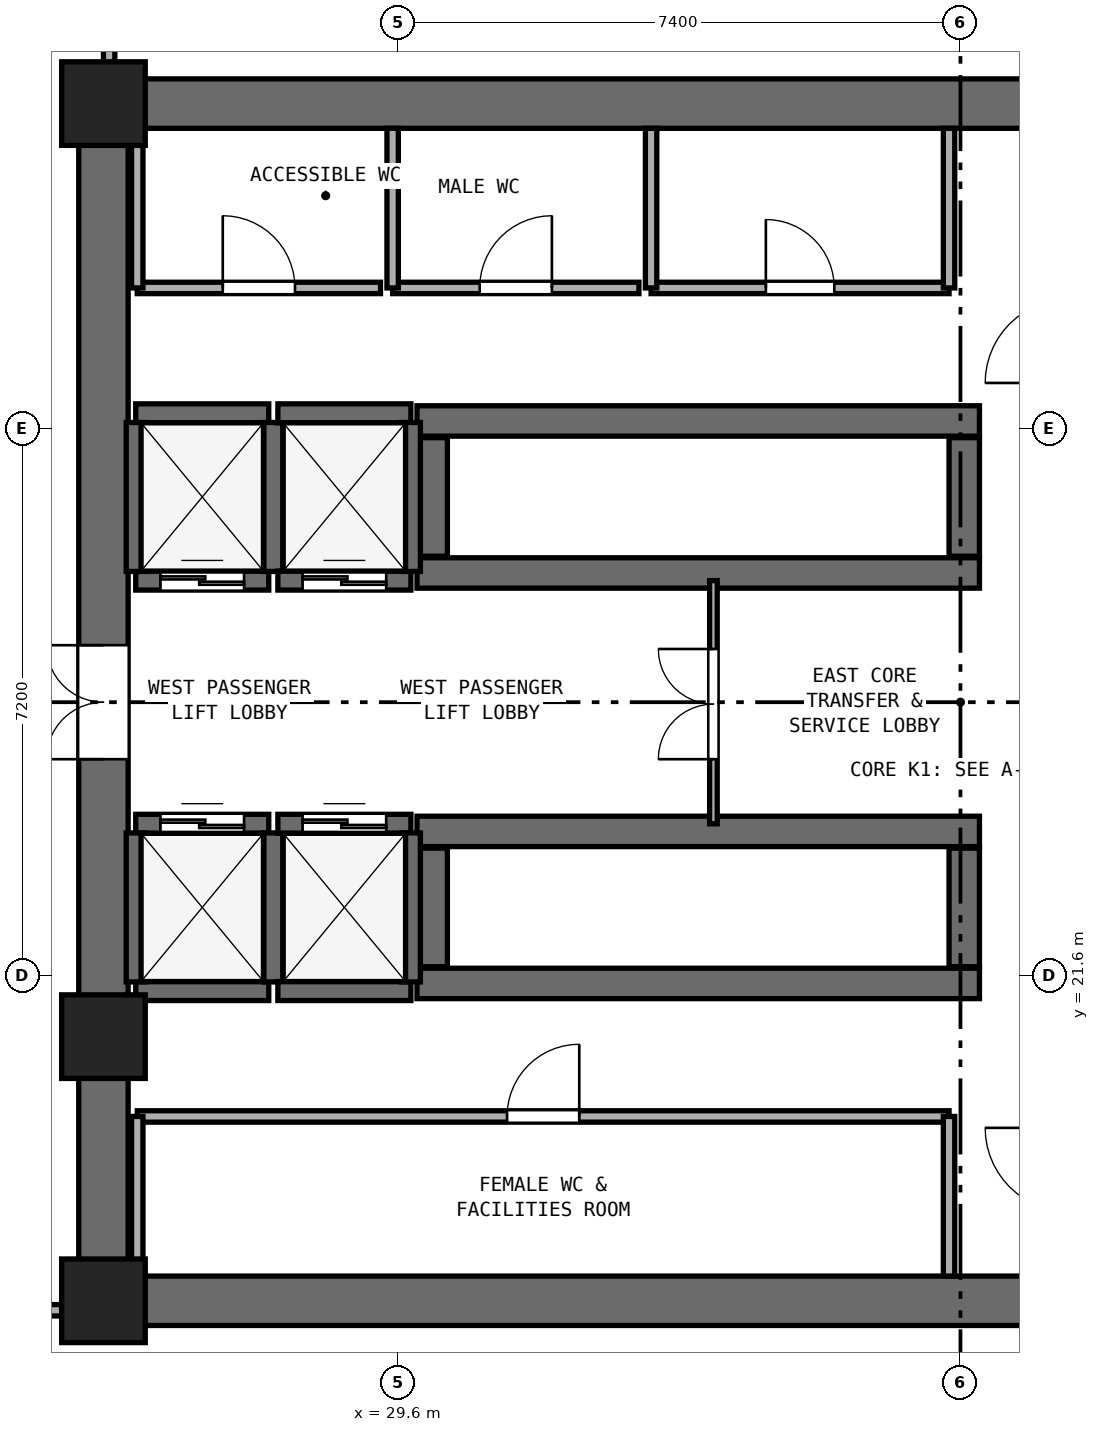
"""IFC4 building model, lengths in metres.
Left out: names, types, materials, properties, quantities, classifications, styles, units other than length and angle.
Written with IfcOpenShell. Run it as: python <this file> out.ifc"""

import sys

from ifc_helpers import new_model, si_unit, direction, frame, frame_2d, origin, origin_2d, place, context, subcontext, project, spatial, rectangle, extrude, element, fill, save


model = new_model("IFC4")
c1 = context("Model", 3, precision=1e-05, world=origin(), true_north=direction((0.0, 1.0)))
c2 = subcontext(c1, "Body", "Model", "MODEL_VIEW")
j1 = project(units=[si_unit("LENGTHUNIT", "METRE"), si_unit("PLANEANGLEUNIT", "RADIAN")], contexts=[c1])
p1 = place(None, origin())
s1 = spatial("IfcSite", under=j1, at=p1, CompositionType="ELEMENT")
p2 = place(p1, origin())
s2 = spatial("IfcBuilding", under=s1, at=p2, CompositionType="ELEMENT")
p3 = place(p2, frame((0.0, 0.0, -4.8)))
s3 = spatial("IfcBuildingStorey", under=s2, at=p3, CompositionType="ELEMENT", Elevation=-4.8)
for number, where, z_axis, x_axis in (
    (1, (25.4, 17.325, 0.0), (0.0, 0.0, 1.0), (1.0, 0.0, 0.0)),
    (2, (25.4, 33.075, 0.0), (0.0, 0.0, 1.0), (1.0, 0.0, 0.0)),
):
    element("IfcWall", number, at=place(p3, frame(where, z_axis=z_axis, x_axis=x_axis)), inside=s3, PredefinedType="SHEAR", context=c2, shape_type="SweptSolid", body=[
        extrude(rectangle(XDim=23.2, YDim=0.65, at=frame_2d((11.6, 0.0))), origin(), (0.0, 0.0, 1.0), 4.45),
    ])
p4 = place(p3, frame((25.725, 17.65, 0.0), z_axis=(0.0, 0.0, 1.0), x_axis=(0.0, 1.0, 0.0)))
e3 = element("IfcWall", 3, at=p4, inside=s3, PredefinedType="SHEAR", context=c2, shape_type="SweptSolid", body=[
    extrude(rectangle(XDim=15.1, YDim=0.65, at=frame_2d((7.55, 0.0))), origin(), (0.0, 0.0, 1.0), 4.45),
])
p5 = place(p4, frame((6.8, 0.0, 0.0)))
e4 = element("IfcOpeningElement", 4, at=p5, cuts=e3, PredefinedType="OPENING", context=c2, shape_type="SweptSolid", body=[
    extrude(rectangle(XDim=1.5, YDim=2.15, at=frame_2d((0.75, 1.075))), frame((0.0, 0.335, 0.0), z_axis=(0.0, -1.0, 0.0), x_axis=(1.0, 0.0, 0.0)), (0.0, 0.0, 1.0), 0.67),
])
for number, where, z_axis, x_axis in (
    (5, (25.725, 17.325, 0.0), (0.0, 0.0, 1.0), (1.0, 0.0, 0.0)),
    (6, (25.725, 33.075, 0.0), (0.0, 0.0, 1.0), (1.0, 0.0, 0.0)),
    (7, (25.725, 20.8, 0.0), (0.0, 0.0, 1.0), (1.0, 0.0, 0.0)),
):
    element("IfcColumn", number, at=place(p3, frame(where, z_axis=z_axis, x_axis=x_axis)), inside=s3, PredefinedType="PILASTER", context=c2, shape_type="SweptSolid", body=[
        extrude(rectangle(XDim=1.1, YDim=1.1, at=origin_2d()), origin(), (0.0, 0.0, 1.0), 4.8),
    ])
for number, where, z_axis, x_axis in (
    (8, (29.85, 21.5, 0.0), (0.0, 0.0, 1.0), (1.0, 0.0, 0.0)),
    (9, (29.85, 23.5, 0.0), (0.0, 0.0, 1.0), (1.0, 0.0, 0.0)),
):
    element("IfcWall", number, at=place(p3, frame(where, z_axis=z_axis, x_axis=x_axis)), inside=s3, PredefinedType="SOLIDWALL", context=c2, shape_type="SweptSolid", body=[
        extrude(rectangle(XDim=7.4, YDim=0.4, at=frame_2d((3.7, 0.0))), origin(), (0.0, 0.0, 1.0), 4.4),
    ])
for number, where, z_axis, x_axis in (
    (10, (30.05, 21.72, 0.0), (0.0, 0.0, 1.0), (0.0, 1.0, 0.0)),
    (11, (37.05, 21.72, 0.0), (0.0, 0.0, 1.0), (0.0, 1.0, 0.0)),
):
    element("IfcWall", number, at=place(p3, frame(where, z_axis=z_axis, x_axis=x_axis)), inside=s3, PredefinedType="SOLIDWALL", context=c2, shape_type="SweptSolid", body=[
        extrude(rectangle(XDim=1.56, YDim=0.4, at=frame_2d((0.78, 0.0))), origin(), (0.0, 0.0, 1.0), 4.4),
    ])
for number, where, z_axis, x_axis in (
    (12, (29.85, 26.9, 0.0), (0.0, 0.0, 1.0), (1.0, 0.0, 0.0)),
    (13, (29.85, 28.9, 0.0), (0.0, 0.0, 1.0), (1.0, 0.0, 0.0)),
):
    element("IfcWall", number, at=place(p3, frame(where, z_axis=z_axis, x_axis=x_axis)), inside=s3, PredefinedType="SOLIDWALL", context=c2, shape_type="SweptSolid", body=[
        extrude(rectangle(XDim=7.4, YDim=0.4, at=frame_2d((3.7, 0.0))), origin(), (0.0, 0.0, 1.0), 4.4),
    ])
for number, where, z_axis, x_axis in (
    (14, (30.05, 27.12, 0.0), (0.0, 0.0, 1.0), (0.0, 1.0, 0.0)),
    (15, (37.05, 27.12, 0.0), (0.0, 0.0, 1.0), (0.0, 1.0, 0.0)),
):
    element("IfcWall", number, at=place(p3, frame(where, z_axis=z_axis, x_axis=x_axis)), inside=s3, PredefinedType="SOLIDWALL", context=c2, shape_type="SweptSolid", body=[
        extrude(rectangle(XDim=1.56, YDim=0.4, at=frame_2d((0.78, 0.0))), origin(), (0.0, 0.0, 1.0), 4.4),
    ])
p6 = place(p3, frame((26.15, 26.8, 0.0), z_axis=(0.0, 0.0, 1.0), x_axis=(1.0, 0.0, 0.0)))
e16 = element("IfcWall", 16, at=p6, inside=s3, PredefinedType="SHEAR", context=c2, shape_type="SweptSolid", body=[
    extrude(rectangle(XDim=1.75, YDim=0.25, at=frame_2d((0.875, 0.0))), origin(), (0.0, 0.0, 1.0), 4.45),
])
p7 = place(p6, frame((0.325, 0.0, 0.0)))
e17 = element("IfcOpeningElement", 17, at=p7, cuts=e16, PredefinedType="OPENING", context=c2, shape_type="SweptSolid", body=[
    extrude(rectangle(XDim=1.1, YDim=2.15, at=frame_2d((0.55, 1.075))), frame((0.0, 0.135, 0.0), z_axis=(0.0, -1.0, 0.0), x_axis=(1.0, 0.0, 0.0)), (0.0, 0.0, 1.0), 0.27),
])
p8 = place(p3, frame((26.15, 29.0, 0.0), z_axis=(0.0, 0.0, 1.0), x_axis=(1.0, 0.0, 0.0)))
e18 = element("IfcWall", 18, at=p8, inside=s3, PredefinedType="SHEAR", context=c2, shape_type="SweptSolid", body=[
    extrude(rectangle(XDim=1.75, YDim=0.25, at=frame_2d((0.875, 0.0))), origin(), (0.0, 0.0, 1.0), 4.45),
])
for number, where, z_axis, x_axis in (
    (19, (26.15, 26.92, 0.0), (0.0, 0.0, 1.0), (0.0, 1.0, 0.0)),
    (20, (27.96, 26.92, 0.0), (0.0, 0.0, 1.0), (0.0, 1.0, 0.0)),
):
    element("IfcWall", number, at=place(p3, frame(where, z_axis=z_axis, x_axis=x_axis)), inside=s3, PredefinedType="SHEAR", context=c2, shape_type="SweptSolid", body=[
        extrude(rectangle(XDim=1.96, YDim=0.25, at=frame_2d((0.98, 0.0))), origin(), (0.0, 0.0, 1.0), 4.45),
    ])
p9 = place(p3, frame((28.02, 26.8, 0.0), z_axis=(0.0, 0.0, 1.0), x_axis=(1.0, 0.0, 0.0)))
e21 = element("IfcWall", 21, at=p9, inside=s3, PredefinedType="SHEAR", context=c2, shape_type="SweptSolid", body=[
    extrude(rectangle(XDim=1.75, YDim=0.25, at=frame_2d((0.875, 0.0))), origin(), (0.0, 0.0, 1.0), 4.45),
])
p10 = place(p9, frame((0.325, 0.0, 0.0)))
e22 = element("IfcOpeningElement", 22, at=p10, cuts=e21, PredefinedType="OPENING", context=c2, shape_type="SweptSolid", body=[
    extrude(rectangle(XDim=1.1, YDim=2.15, at=frame_2d((0.55, 1.075))), frame((0.0, 0.135, 0.0), z_axis=(0.0, -1.0, 0.0), x_axis=(1.0, 0.0, 0.0)), (0.0, 0.0, 1.0), 0.27),
])
p11 = place(p3, frame((28.02, 29.0, 0.0), z_axis=(0.0, 0.0, 1.0), x_axis=(1.0, 0.0, 0.0)))
e23 = element("IfcWall", 23, at=p11, inside=s3, PredefinedType="SHEAR", context=c2, shape_type="SweptSolid", body=[
    extrude(rectangle(XDim=1.75, YDim=0.25, at=frame_2d((0.875, 0.0))), origin(), (0.0, 0.0, 1.0), 4.45),
])
p12 = place(p3, frame((29.77, 26.92, 0.0), z_axis=(0.0, 0.0, 1.0), x_axis=(0.0, 1.0, 0.0)))
e24 = element("IfcWall", 24, at=p12, inside=s3, PredefinedType="SHEAR", context=c2, shape_type="SweptSolid", body=[
    extrude(rectangle(XDim=1.96, YDim=0.25, at=frame_2d((0.98, 0.0))), origin(), (0.0, 0.0, 1.0), 4.45),
])
p13 = place(p3, frame((26.15, 21.4, 0.0), z_axis=(0.0, 0.0, 1.0), x_axis=(1.0, 0.0, 0.0)))
e25 = element("IfcWall", 25, at=p13, inside=s3, PredefinedType="SHEAR", context=c2, shape_type="SweptSolid", body=[
    extrude(rectangle(XDim=1.75, YDim=0.25, at=frame_2d((0.875, 0.0))), origin(), (0.0, 0.0, 1.0), 4.45),
])
p14 = place(p3, frame((26.15, 23.6, 0.0), z_axis=(0.0, 0.0, 1.0), x_axis=(1.0, 0.0, 0.0)))
e26 = element("IfcWall", 26, at=p14, inside=s3, PredefinedType="SHEAR", context=c2, shape_type="SweptSolid", body=[
    extrude(rectangle(XDim=1.75, YDim=0.25, at=frame_2d((0.875, 0.0))), origin(), (0.0, 0.0, 1.0), 4.45),
])
p15 = place(p14, frame((0.325, 0.0, 0.0)))
e27 = element("IfcOpeningElement", 27, at=p15, cuts=e26, PredefinedType="OPENING", context=c2, shape_type="SweptSolid", body=[
    extrude(rectangle(XDim=1.1, YDim=2.15, at=frame_2d((0.55, 1.075))), frame((0.0, 0.135, 0.0), z_axis=(0.0, -1.0, 0.0), x_axis=(1.0, 0.0, 0.0)), (0.0, 0.0, 1.0), 0.27),
])
for number, where, z_axis, x_axis in (
    (28, (26.15, 21.52, 0.0), (0.0, 0.0, 1.0), (0.0, 1.0, 0.0)),
    (29, (27.96, 21.52, 0.0), (0.0, 0.0, 1.0), (0.0, 1.0, 0.0)),
):
    element("IfcWall", number, at=place(p3, frame(where, z_axis=z_axis, x_axis=x_axis)), inside=s3, PredefinedType="SHEAR", context=c2, shape_type="SweptSolid", body=[
        extrude(rectangle(XDim=1.96, YDim=0.25, at=frame_2d((0.98, 0.0))), origin(), (0.0, 0.0, 1.0), 4.45),
    ])
p16 = place(p3, frame((28.02, 21.4, 0.0), z_axis=(0.0, 0.0, 1.0), x_axis=(1.0, 0.0, 0.0)))
e30 = element("IfcWall", 30, at=p16, inside=s3, PredefinedType="SHEAR", context=c2, shape_type="SweptSolid", body=[
    extrude(rectangle(XDim=1.75, YDim=0.25, at=frame_2d((0.875, 0.0))), origin(), (0.0, 0.0, 1.0), 4.45),
])
p17 = place(p3, frame((28.02, 23.6, 0.0), z_axis=(0.0, 0.0, 1.0), x_axis=(1.0, 0.0, 0.0)))
e31 = element("IfcWall", 31, at=p17, inside=s3, PredefinedType="SHEAR", context=c2, shape_type="SweptSolid", body=[
    extrude(rectangle(XDim=1.75, YDim=0.25, at=frame_2d((0.875, 0.0))), origin(), (0.0, 0.0, 1.0), 4.45),
])
p18 = place(p17, frame((0.325, 0.0, 0.0)))
e32 = element("IfcOpeningElement", 32, at=p18, cuts=e31, PredefinedType="OPENING", context=c2, shape_type="SweptSolid", body=[
    extrude(rectangle(XDim=1.1, YDim=2.15, at=frame_2d((0.55, 1.075))), frame((0.0, 0.135, 0.0), z_axis=(0.0, -1.0, 0.0), x_axis=(1.0, 0.0, 0.0)), (0.0, 0.0, 1.0), 0.27),
])
p19 = place(p3, frame((29.77, 21.52, 0.0), z_axis=(0.0, 0.0, 1.0), x_axis=(0.0, 1.0, 0.0)))
e33 = element("IfcWall", 33, at=p19, inside=s3, PredefinedType="SHEAR", context=c2, shape_type="SweptSolid", body=[
    extrude(rectangle(XDim=1.96, YDim=0.25, at=frame_2d((0.98, 0.0))), origin(), (0.0, 0.0, 1.0), 4.45),
])
p20 = place(p3, frame((26.17, 30.65, 0.0), z_axis=(0.0, 0.0, 1.0), x_axis=(1.0, 0.0, 0.0)))
e34 = element("IfcWall", 34, at=p20, inside=s3, PredefinedType="PARTITIONING", context=c2, shape_type="SweptSolid", body=[
    extrude(rectangle(XDim=3.2, YDim=0.15, at=frame_2d((1.6, 0.0))), origin(), (0.0, 0.0, 1.0), 4.45),
])
p21 = place(p20, frame((1.125, 0.0, 0.0)))
e35 = element("IfcOpeningElement", 35, at=p21, cuts=e34, PredefinedType="OPENING", context=c2, shape_type="SweptSolid", body=[
    extrude(rectangle(XDim=0.95, YDim=2.1, at=frame_2d((0.475, 1.05))), frame((0.0, 0.085, 0.0), z_axis=(0.0, -1.0, 0.0), x_axis=(1.0, 0.0, 0.0)), (0.0, 0.0, 1.0), 0.17),
])
p22 = place(p3, frame((26.17, 30.65, 0.0), z_axis=(0.0, 0.0, 1.0), x_axis=(0.0, 1.0, 0.0)))
e36 = element("IfcWall", 36, at=p22, inside=s3, PredefinedType="PARTITIONING", context=c2, shape_type="SweptSolid", body=[
    extrude(rectangle(XDim=2.1, YDim=0.15, at=frame_2d((1.05, 0.0))), origin(), (0.0, 0.0, 1.0), 4.45),
])
p23 = place(p3, frame((29.53, 30.65, 0.0), z_axis=(0.0, 0.0, 1.0), x_axis=(1.0, 0.0, 0.0)))
e37 = element("IfcWall", 37, at=p23, inside=s3, PredefinedType="PARTITIONING", context=c2, shape_type="SweptSolid", body=[
    extrude(rectangle(XDim=3.24, YDim=0.15, at=frame_2d((1.62, 0.0))), origin(), (0.0, 0.0, 1.0), 4.45),
])
p24 = place(p23, frame((1.145, 0.0, 0.0)))
e38 = element("IfcOpeningElement", 38, at=p24, cuts=e37, PredefinedType="OPENING", context=c2, shape_type="SweptSolid", body=[
    extrude(rectangle(XDim=0.95, YDim=2.1, at=frame_2d((0.475, 1.05))), frame((0.0, 0.085, 0.0), z_axis=(0.0, -1.0, 0.0), x_axis=(1.0, 0.0, 0.0)), (0.0, 0.0, 1.0), 0.17),
])
p25 = place(p3, frame((29.53, 30.65, 0.0), z_axis=(0.0, 0.0, 1.0), x_axis=(0.0, 1.0, 0.0)))
e39 = element("IfcWall", 39, at=p25, inside=s3, PredefinedType="PARTITIONING", context=c2, shape_type="SweptSolid", body=[
    extrude(rectangle(XDim=2.1, YDim=0.15, at=frame_2d((1.05, 0.0))), origin(), (0.0, 0.0, 1.0), 4.45),
])
p26 = place(p3, frame((32.93, 30.65, 0.0), z_axis=(0.0, 0.0, 1.0), x_axis=(1.0, 0.0, 0.0)))
e40 = element("IfcWall", 40, at=p26, inside=s3, PredefinedType="PARTITIONING", context=c2, shape_type="SweptSolid", body=[
    extrude(rectangle(XDim=3.92, YDim=0.15, at=frame_2d((1.96, 0.0))), origin(), (0.0, 0.0, 1.0), 4.45),
])
p27 = place(p26, frame((1.51, 0.0, 0.0)))
e41 = element("IfcOpeningElement", 41, at=p27, cuts=e40, PredefinedType="OPENING", context=c2, shape_type="SweptSolid", body=[
    extrude(rectangle(XDim=0.9, YDim=2.1, at=frame_2d((0.45, 1.05))), frame((0.0, 0.085, 0.0), z_axis=(0.0, -1.0, 0.0), x_axis=(1.0, 0.0, 0.0)), (0.0, 0.0, 1.0), 0.17),
])
for number, where, z_axis, x_axis in (
    (42, (32.93, 30.65, 0.0), (0.0, 0.0, 1.0), (0.0, 1.0, 0.0)),
    (43, (36.85, 30.65, 0.0), (0.0, 0.0, 1.0), (0.0, 1.0, 0.0)),
):
    element("IfcWall", number, at=place(p3, frame(where, z_axis=z_axis, x_axis=x_axis)), inside=s3, PredefinedType="PARTITIONING", context=c2, shape_type="SweptSolid", body=[
        extrude(rectangle(XDim=2.1, YDim=0.15, at=frame_2d((1.05, 0.0))), origin(), (0.0, 0.0, 1.0), 4.45),
    ])
p28 = place(p3, frame((26.17, 19.75, 0.0), z_axis=(0.0, 0.0, 1.0), x_axis=(1.0, 0.0, 0.0)))
e44 = element("IfcWall", 44, at=p28, inside=s3, PredefinedType="PARTITIONING", context=c2, shape_type="SweptSolid", body=[
    extrude(rectangle(XDim=10.68, YDim=0.15, at=frame_2d((5.34, 0.0))), origin(), (0.0, 0.0, 1.0), 4.45),
])
p29 = place(p28, frame((4.865, 0.0, 0.0)))
e45 = element("IfcOpeningElement", 45, at=p29, cuts=e44, PredefinedType="OPENING", context=c2, shape_type="SweptSolid", body=[
    extrude(rectangle(XDim=0.95, YDim=2.1, at=frame_2d((0.475, 1.05))), frame((0.0, 0.085, 0.0), z_axis=(0.0, -1.0, 0.0), x_axis=(1.0, 0.0, 0.0)), (0.0, 0.0, 1.0), 0.17),
])
for number, where, z_axis, x_axis in (
    (46, (26.17, 17.65, 0.0), (0.0, 0.0, 1.0), (0.0, 1.0, 0.0)),
    (47, (36.85, 17.65, 0.0), (0.0, 0.0, 1.0), (0.0, 1.0, 0.0)),
):
    element("IfcWall", number, at=place(p3, frame(where, z_axis=z_axis, x_axis=x_axis)), inside=s3, PredefinedType="PARTITIONING", context=c2, shape_type="SweptSolid", body=[
        extrude(rectangle(XDim=2.1, YDim=0.15, at=frame_2d((1.05, 0.0))), origin(), (0.0, 0.0, 1.0), 4.45),
    ])
p30 = place(p3, frame((33.75, 23.6, 0.0), z_axis=(0.0, 0.0, 1.0), x_axis=(0.0, 1.0, 0.0)))
e48 = element("IfcWall", 48, at=p30, inside=s3, PredefinedType="PARTITIONING", context=c2, shape_type="SweptSolid", body=[
    extrude(rectangle(XDim=3.2, YDim=0.1, at=frame_2d((1.6, 0.0))), origin(), (0.0, 0.0, 1.0), 4.45),
])
p31 = place(p30, frame((0.85, 0.0, 0.0)))
e49 = element("IfcOpeningElement", 49, at=p31, cuts=e48, PredefinedType="OPENING", context=c2, shape_type="SweptSolid", body=[
    extrude(rectangle(XDim=1.45, YDim=2.12, at=frame_2d((0.725, 1.06))), frame((0.0, 0.06, 0.0), z_axis=(0.0, -1.0, 0.0), x_axis=(1.0, 0.0, 0.0)), (0.0, 0.0, 1.0), 0.12),
])
p32 = place(p3, frame((25.8, 33.54, 0.0), z_axis=(0.0, 0.0, 1.0), x_axis=(0.0, 1.0, 0.0)))
e50 = element("IfcWall", 50, at=p32, inside=s3, PredefinedType="PARTITIONING", context=c2, shape_type="SweptSolid", body=[
    extrude(rectangle(XDim=3.96, YDim=0.15, at=frame_2d((1.98, 0.0))), origin(), (0.0, 0.0, 1.0), 4.45),
])
p33 = place(p3, frame((22.96, 17.2, 0.0), z_axis=(0.0, 0.0, 1.0), x_axis=(1.0, 0.0, 0.0)))
e51 = element("IfcWall", 51, at=p33, inside=s3, PredefinedType="PARTITIONING", context=c2, shape_type="SweptSolid", body=[
    extrude(rectangle(XDim=2.3, YDim=0.15, at=frame_2d((1.15, 0.0))), origin(), (0.0, 0.0, 1.0), 4.45),
])
p34 = place(p7, origin())
e52 = element("IfcDoor", 52, at=p34, inside=s3, OperationType="DOUBLE_DOOR_SLIDING", PredefinedType="DOOR", context=c2, shape_type="SweptSolid", body=[
    extrude(rectangle(XDim=1.1, YDim=2.15, at=frame_2d((0.55, 1.075))), frame((0.0, 0.025, 0.0), z_axis=(0.0, -1.0, 0.0), x_axis=(1.0, 0.0, 0.0)), (0.0, 0.0, 1.0), 0.05),
])
fill(e17, e52)
p35 = place(p10, origin())
e53 = element("IfcDoor", 53, at=p35, inside=s3, OperationType="DOUBLE_DOOR_SLIDING", PredefinedType="DOOR", context=c2, shape_type="SweptSolid", body=[
    extrude(rectangle(XDim=1.1, YDim=2.15, at=frame_2d((0.55, 1.075))), frame((0.0, 0.025, 0.0), z_axis=(0.0, -1.0, 0.0), x_axis=(1.0, 0.0, 0.0)), (0.0, 0.0, 1.0), 0.05),
])
fill(e22, e53)
p36 = place(p15, origin())
e54 = element("IfcDoor", 54, at=p36, inside=s3, OperationType="DOUBLE_DOOR_SLIDING", PredefinedType="DOOR", context=c2, shape_type="SweptSolid", body=[
    extrude(rectangle(XDim=1.1, YDim=2.15, at=frame_2d((0.55, 1.075))), frame((0.0, 0.025, 0.0), z_axis=(0.0, -1.0, 0.0), x_axis=(1.0, 0.0, 0.0)), (0.0, 0.0, 1.0), 0.05),
])
fill(e27, e54)
p37 = place(p18, origin())
e55 = element("IfcDoor", 55, at=p37, inside=s3, OperationType="DOUBLE_DOOR_SLIDING", PredefinedType="DOOR", context=c2, shape_type="SweptSolid", body=[
    extrude(rectangle(XDim=1.1, YDim=2.15, at=frame_2d((0.55, 1.075))), frame((0.0, 0.025, 0.0), z_axis=(0.0, -1.0, 0.0), x_axis=(1.0, 0.0, 0.0)), (0.0, 0.0, 1.0), 0.05),
])
fill(e32, e55)
p38 = place(p5, origin())
e56 = element("IfcDoor", 56, at=p38, inside=s3, OperationType="DOUBLE_DOOR_SINGLE_SWING", PredefinedType="DOOR", context=c2, shape_type="SweptSolid", body=[
    extrude(rectangle(XDim=1.5, YDim=2.15, at=frame_2d((0.75, 1.075))), frame((0.0, 0.025, 0.0), z_axis=(0.0, -1.0, 0.0), x_axis=(1.0, 0.0, 0.0)), (0.0, 0.0, 1.0), 0.05),
])
fill(e4, e56)
p39 = place(p21, origin())
e57 = element("IfcDoor", 57, at=p39, inside=s3, OperationType="SINGLE_SWING_LEFT", PredefinedType="DOOR", context=c2, shape_type="SweptSolid", body=[
    extrude(rectangle(XDim=0.95, YDim=2.1, at=frame_2d((0.475, 1.05))), frame((0.0, 0.025, 0.0), z_axis=(0.0, -1.0, 0.0), x_axis=(1.0, 0.0, 0.0)), (0.0, 0.0, 1.0), 0.05),
])
fill(e35, e57)
p40 = place(p24, origin())
e58 = element("IfcDoor", 58, at=p40, inside=s3, OperationType="SINGLE_SWING_RIGHT", PredefinedType="DOOR", context=c2, shape_type="SweptSolid", body=[
    extrude(rectangle(XDim=0.95, YDim=2.1, at=frame_2d((0.475, 1.05))), frame((0.0, 0.025, 0.0), z_axis=(0.0, -1.0, 0.0), x_axis=(1.0, 0.0, 0.0)), (0.0, 0.0, 1.0), 0.05),
])
fill(e38, e58)
p41 = place(p27, origin())
e59 = element("IfcDoor", 59, at=p41, inside=s3, OperationType="SINGLE_SWING_LEFT", PredefinedType="DOOR", context=c2, shape_type="SweptSolid", body=[
    extrude(rectangle(XDim=0.9, YDim=2.1, at=frame_2d((0.45, 1.05))), frame((0.0, 0.025, 0.0), z_axis=(0.0, -1.0, 0.0), x_axis=(1.0, 0.0, 0.0)), (0.0, 0.0, 1.0), 0.05),
])
fill(e41, e59)
p42 = place(p29, origin())
e60 = element("IfcDoor", 60, at=p42, inside=s3, OperationType="SINGLE_SWING_RIGHT", PredefinedType="DOOR", context=c2, shape_type="SweptSolid", body=[
    extrude(rectangle(XDim=0.95, YDim=2.1, at=frame_2d((0.475, 1.05))), frame((0.0, 0.025, 0.0), z_axis=(0.0, -1.0, 0.0), x_axis=(1.0, 0.0, 0.0)), (0.0, 0.0, 1.0), 0.05),
])
fill(e45, e60)
p43 = place(p31, origin())
e61 = element("IfcDoor", 61, at=p43, inside=s3, OperationType="DOUBLE_DOOR_SINGLE_SWING", PredefinedType="DOOR", context=c2, shape_type="SweptSolid", body=[
    extrude(rectangle(XDim=1.45, YDim=2.12, at=frame_2d((0.725, 1.06))), frame((0.0, 0.025, 0.0), z_axis=(0.0, -1.0, 0.0), x_axis=(1.0, 0.0, 0.0)), (0.0, 0.0, 1.0), 0.05),
])
fill(e49, e61)
save(model, sys.argv[1])
